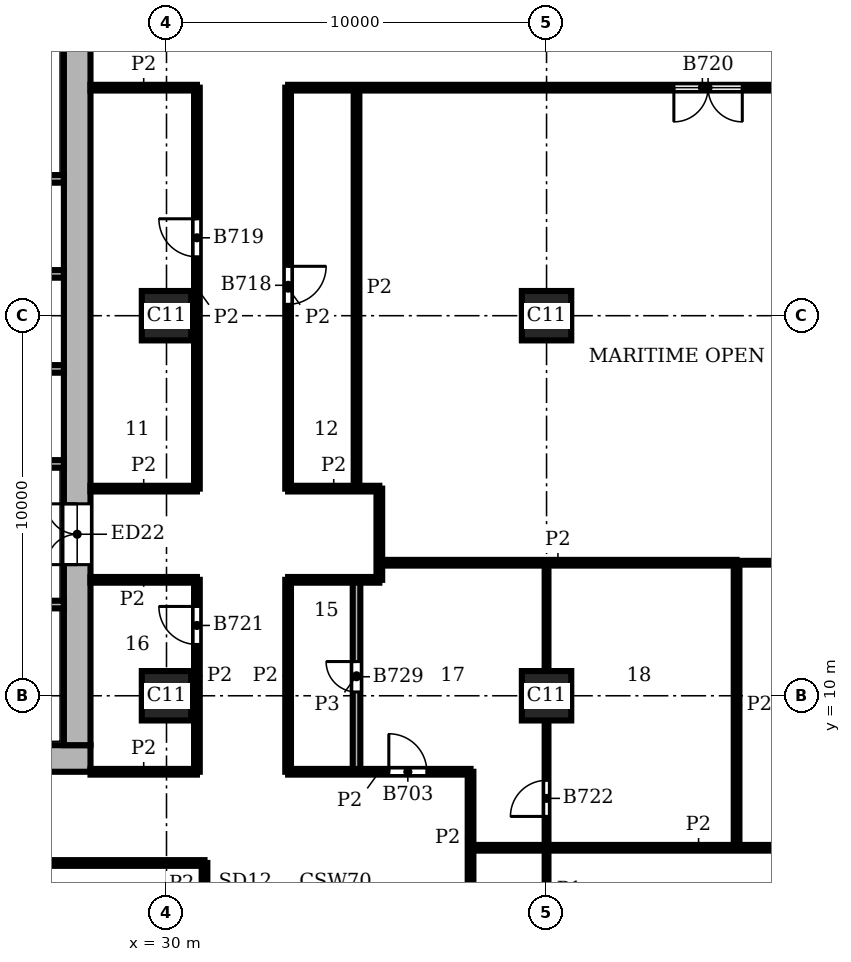
"""IFC4 building model, lengths in metres.
Left out: names, types, materials, properties, quantities, classifications, styles, units other than length and angle.
Written with IfcOpenShell. Run it as: python <this file> out.ifc"""

import sys

from ifc_helpers import new_model, si_unit, direction, frame, frame_2d, origin, origin_2d, place, context, subcontext, project, spatial, rectangle, extrude, element, fill, save


model = new_model("IFC4")
c1 = context("Model", 3, precision=1e-05, world=origin(), true_north=direction((0.0, 1.0)))
c2 = subcontext(c1, "Body", "Model", "MODEL_VIEW")
j1 = project(units=[si_unit("LENGTHUNIT", "METRE"), si_unit("PLANEANGLEUNIT", "RADIAN")], contexts=[c1])
p1 = place(None, origin())
s1 = spatial("IfcSite", under=j1, at=p1, CompositionType="ELEMENT")
p2 = place(p1, origin())
s2 = spatial("IfcBuilding", under=s1, at=p2, CompositionType="ELEMENT")
p3 = place(p2, frame((0.0, 0.0, 205.8)))
s3 = spatial("IfcBuildingStorey", under=s2, at=p3, CompositionType="ELEMENT", Elevation=205.8)
for number, where, z_axis, x_axis in (
    (1, (30.0, 10.0, 0.0), (0.0, 0.0, 1.0), (1.0, 0.0, 0.0)),
    (2, (30.0, 20.0, 0.0), (0.0, 0.0, 1.0), (1.0, 0.0, 0.0)),
    (3, (40.0, 10.0, 0.0), (0.0, 0.0, 1.0), (1.0, 0.0, 0.0)),
    (4, (40.0, 20.0, 0.0), (0.0, 0.0, 1.0), (1.0, 0.0, 0.0)),
):
    element("IfcColumn", number, at=place(p3, frame(where, z_axis=z_axis, x_axis=x_axis)), inside=s3, PredefinedType="COLUMN", context=c2, shape_type="SweptSolid", body=[
        extrude(rectangle(XDim=1.3, YDim=1.3, at=origin_2d()), origin(), (0.0, 0.0, 1.0), 3.9),
    ])
p4 = place(p3, frame((8.0, 8.35, 0.0), z_axis=(0.0, 0.0, 1.0), x_axis=(1.0, 0.0, 0.0)))
e5 = element("IfcWall", 5, at=p4, inside=s3, PredefinedType="SHEAR", context=c2, shape_type="SweptSolid", body=[
    extrude(rectangle(XDim=20.0, YDim=0.7, at=frame_2d((10.0, 0.0))), origin(), (0.0, 0.0, 1.0), 3.9),
])
p5 = place(p3, frame((27.65, 8.7, 0.0), z_axis=(0.0, 0.0, 1.0), x_axis=(0.0, 1.0, 0.0)))
e6 = element("IfcWall", 6, at=p5, inside=s3, PredefinedType="SHEAR", context=c2, shape_type="SweptSolid", body=[
    extrude(rectangle(XDim=18.6, YDim=0.7, at=frame_2d((9.3, 0.0))), origin(), (0.0, 0.0, 1.0), 3.9),
])
p6 = place(p5, frame((4.75, 0.0, 0.0)))
e7 = element("IfcOpeningElement", 7, at=p6, cuts=e6, PredefinedType="OPENING", context=c2, shape_type="SweptSolid", body=[
    extrude(rectangle(XDim=1.6, YDim=2.1, at=frame_2d((0.8, 1.05))), frame((0.0, 0.36, 0.0), z_axis=(0.0, -1.0, 0.0), x_axis=(1.0, 0.0, 0.0)), (0.0, 0.0, 1.0), 0.72),
])
p7 = place(p3, frame((13.8, 12.4, 0.0), z_axis=(0.0, 0.0, 1.0), x_axis=(1.0, 0.0, 0.0)))
e8 = element("IfcWall", 8, at=p7, inside=s3, PredefinedType="SHEAR", context=c2, shape_type="SweptSolid", body=[
    extrude(rectangle(XDim=13.5, YDim=0.2, at=frame_2d((6.75, 0.0))), origin(), (0.0, 0.0, 1.0), 3.58),
])
p8 = place(p7, frame((2.4, 0.0, 0.0)))
e9 = element("IfcOpeningElement", 9, at=p8, cuts=e8, PredefinedType="OPENING", context=c2, shape_type="SweptSolid", body=[
    extrude(rectangle(XDim=1.1, YDim=2.1, at=frame_2d((0.55, 1.05))), frame((0.0, 0.11, 0.0), z_axis=(0.0, -1.0, 0.0), x_axis=(1.0, 0.0, 0.0)), (0.0, 0.0, 1.0), 0.22),
])
p9 = place(p7, frame((4.9, 0.0, 0.0)))
e10 = element("IfcOpeningElement", 10, at=p9, cuts=e8, PredefinedType="OPENING", context=c2, shape_type="SweptSolid", body=[
    extrude(rectangle(XDim=1.1, YDim=2.1, at=frame_2d((0.55, 1.05))), frame((0.0, 0.11, 0.0), z_axis=(0.0, -1.0, 0.0), x_axis=(1.0, 0.0, 0.0)), (0.0, 0.0, 1.0), 0.22),
])
p10 = place(p7, frame((0.2, 0.0, 0.0)))
e11 = element("IfcOpeningElement", 11, at=p10, cuts=e8, PredefinedType="OPENING", context=c2, shape_type="SweptSolid", body=[
    extrude(rectangle(XDim=1.0, YDim=2.1, at=frame_2d((0.5, 1.05))), frame((0.0, 0.11, 0.0), z_axis=(0.0, -1.0, 0.0), x_axis=(1.0, 0.0, 0.0)), (0.0, 0.0, 1.0), 0.22),
])
for number, where, z_axis, x_axis in (
    (12, (24.3, 16.1, 0.0), (0.0, 0.0, 1.0), (1.0, 0.0, 0.0)),
    (13, (24.3, 18.6, 0.0), (0.0, 0.0, 1.0), (1.0, 0.0, 0.0)),
    (14, (24.3, 21.1, 0.0), (0.0, 0.0, 1.0), (1.0, 0.0, 0.0)),
):
    element("IfcWall", number, at=place(p3, frame(where, z_axis=z_axis, x_axis=x_axis)), inside=s3, PredefinedType="SHEAR", context=c2, shape_type="SweptSolid", body=[
        extrude(rectangle(XDim=3.0, YDim=0.2, at=frame_2d((1.5, 0.0))), origin(), (0.0, 0.0, 1.0), 3.58),
    ])
p11 = place(p3, frame((13.8, 23.6, 0.0), z_axis=(0.0, 0.0, 1.0), x_axis=(1.0, 0.0, 0.0)))
e15 = element("IfcWall", 15, at=p11, inside=s3, PredefinedType="SHEAR", context=c2, shape_type="SweptSolid", body=[
    extrude(rectangle(XDim=13.5, YDim=0.2, at=frame_2d((6.75, 0.0))), origin(), (0.0, 0.0, 1.0), 3.58),
])
p12 = place(p11, frame((2.4, 0.0, 0.0)))
e16 = element("IfcOpeningElement", 16, at=p12, cuts=e15, PredefinedType="OPENING", context=c2, shape_type="SweptSolid", body=[
    extrude(rectangle(XDim=1.1, YDim=2.1, at=frame_2d((0.55, 1.05))), frame((0.0, 0.11, 0.0), z_axis=(0.0, -1.0, 0.0), x_axis=(1.0, 0.0, 0.0)), (0.0, 0.0, 1.0), 0.22),
])
p13 = place(p11, frame((4.9, 0.0, 0.0)))
e17 = element("IfcOpeningElement", 17, at=p13, cuts=e15, PredefinedType="OPENING", context=c2, shape_type="SweptSolid", body=[
    extrude(rectangle(XDim=1.1, YDim=2.1, at=frame_2d((0.55, 1.05))), frame((0.0, 0.11, 0.0), z_axis=(0.0, -1.0, 0.0), x_axis=(1.0, 0.0, 0.0)), (0.0, 0.0, 1.0), 0.22),
])
p14 = place(p11, frame((0.2, 0.0, 0.0)))
e18 = element("IfcOpeningElement", 18, at=p14, cuts=e15, PredefinedType="OPENING", context=c2, shape_type="SweptSolid", body=[
    extrude(rectangle(XDim=1.0, YDim=2.1, at=frame_2d((0.5, 1.05))), frame((0.0, 0.11, 0.0), z_axis=(0.0, -1.0, 0.0), x_axis=(1.0, 0.0, 0.0)), (0.0, 0.0, 1.0), 0.22),
])
p15 = place(p3, frame((40.0, 0.45, 0.0), z_axis=(0.0, 0.0, 1.0), x_axis=(0.0, 1.0, 0.0)))
e19 = element("IfcWall", 19, at=p15, inside=s3, PredefinedType="PARTITIONING", context=c2, shape_type="SweptSolid", body=[
    extrude(rectangle(XDim=8.9, YDim=0.1, at=frame_2d((4.45, 0.0))), origin(), (0.0, 0.0, 1.0), 3.58),
])
p16 = place(p15, frame((6.375, 0.0, 0.0)))
e20 = element("IfcOpeningElement", 20, at=p16, cuts=e19, PredefinedType="OPENING", context=c2, shape_type="SweptSolid", body=[
    extrude(rectangle(XDim=0.95, YDim=2.1, at=frame_2d((0.475, 1.05))), frame((0.0, 0.06, 0.0), z_axis=(0.0, -1.0, 0.0), x_axis=(1.0, 0.0, 0.0)), (0.0, 0.0, 1.0), 0.12),
])
p17 = place(p15, frame((3.0, 0.0, 0.0)))
e21 = element("IfcOpeningElement", 21, at=p17, cuts=e19, PredefinedType="OPENING", context=c2, shape_type="SweptSolid", body=[
    extrude(rectangle(XDim=0.9, YDim=2.1, at=frame_2d((0.45, 1.05))), frame((0.0, 0.06, 0.0), z_axis=(0.0, -1.0, 0.0), x_axis=(1.0, 0.0, 0.0)), (0.0, 0.0, 1.0), 0.12),
])
p18 = place(p3, frame((40.0, 10.65, 0.0), z_axis=(0.0, 0.0, 1.0), x_axis=(0.0, 1.0, 0.0)))
e22 = element("IfcWall", 22, at=p18, inside=s3, PredefinedType="PARTITIONING", context=c2, shape_type="SweptSolid", body=[
    extrude(rectangle(XDim=2.85, YDim=0.1, at=frame_2d((1.425, 0.0))), origin(), (0.0, 0.0, 1.0), 3.58),
])
p19 = place(p3, frame((45.0, 13.5, 0.0), z_axis=(0.0, 0.0, 1.0), x_axis=(1.0, 0.0, 0.0)))
e23 = element("IfcWall", 23, at=p19, inside=s3, PredefinedType="PARTITIONING", context=c2, shape_type="SweptSolid", body=[
    extrude(rectangle(XDim=5.0, YDim=0.1, at=frame_2d((2.5, 0.0))), origin(), (0.0, 0.0, 1.0), 3.58),
])
p20 = place(p19, frame((2.35, 0.0, 0.0)))
e24 = element("IfcOpeningElement", 24, at=p20, cuts=e23, PredefinedType="OPENING", context=c2, shape_type="SweptSolid", body=[
    extrude(rectangle(XDim=0.9, YDim=2.1, at=frame_2d((0.45, 1.05))), frame((0.0, 0.06, 0.0), z_axis=(0.0, -1.0, 0.0), x_axis=(1.0, 0.0, 0.0)), (0.0, 0.0, 1.0), 0.12),
])
p21 = place(p3, frame((30.8, 8.0, 0.0), z_axis=(0.0, 0.0, 1.0), x_axis=(0.0, 1.0, 0.0)))
e25 = element("IfcWall", 25, at=p21, inside=s3, PredefinedType="PARTITIONING", context=c2, shape_type="SweptSolid", body=[
    extrude(rectangle(XDim=5.05, YDim=0.15, at=frame_2d((2.525, 0.0))), origin(), (0.0, 0.0, 1.0), 3.58),
])
p22 = place(p21, frame((3.35, 0.0, 0.0)))
e26 = element("IfcOpeningElement", 26, at=p22, cuts=e25, PredefinedType="OPENING", context=c2, shape_type="SweptSolid", body=[
    extrude(rectangle(XDim=1.0, YDim=2.1, at=frame_2d((0.5, 1.05))), frame((0.0, 0.085, 0.0), z_axis=(0.0, -1.0, 0.0), x_axis=(1.0, 0.0, 0.0)), (0.0, 0.0, 1.0), 0.17),
])
p23 = place(p3, frame((30.8, 15.45, 0.0), z_axis=(0.0, 0.0, 1.0), x_axis=(0.0, 1.0, 0.0)))
e27 = element("IfcWall", 27, at=p23, inside=s3, PredefinedType="PARTITIONING", context=c2, shape_type="SweptSolid", body=[
    extrude(rectangle(XDim=10.55, YDim=0.15, at=frame_2d((5.275, 0.0))), origin(), (0.0, 0.0, 1.0), 3.58),
])
p24 = place(p23, frame((6.1, 0.0, 0.0)))
e28 = element("IfcOpeningElement", 28, at=p24, cuts=e27, PredefinedType="OPENING", context=c2, shape_type="SweptSolid", body=[
    extrude(rectangle(XDim=1.0, YDim=2.1, at=frame_2d((0.5, 1.05))), frame((0.0, 0.085, 0.0), z_axis=(0.0, -1.0, 0.0), x_axis=(1.0, 0.0, 0.0)), (0.0, 0.0, 1.0), 0.17),
])
p25 = place(p3, frame((31.0, 4.5, 0.0), z_axis=(0.0, 0.0, 1.0), x_axis=(0.0, 1.0, 0.0)))
e29 = element("IfcWall", 29, at=p25, inside=s3, PredefinedType="PARTITIONING", context=c2, shape_type="SweptSolid", body=[
    extrude(rectangle(XDim=1.1, YDim=0.15, at=frame_2d((0.55, 0.0))), origin(), (0.0, 0.0, 1.0), 3.58),
])
p26 = place(p3, frame((33.2, 8.0, 0.0), z_axis=(0.0, 0.0, 1.0), x_axis=(0.0, 1.0, 0.0)))
e30 = element("IfcWall", 30, at=p26, inside=s3, PredefinedType="PARTITIONING", context=c2, shape_type="SweptSolid", body=[
    extrude(rectangle(XDim=5.05, YDim=0.15, at=frame_2d((2.525, 0.0))), origin(), (0.0, 0.0, 1.0), 3.58),
])
p27 = place(p3, frame((33.2, 15.45, 0.0), z_axis=(0.0, 0.0, 1.0), x_axis=(0.0, 1.0, 0.0)))
e31 = element("IfcWall", 31, at=p27, inside=s3, PredefinedType="PARTITIONING", context=c2, shape_type="SweptSolid", body=[
    extrude(rectangle(XDim=10.55, YDim=0.15, at=frame_2d((5.275, 0.0))), origin(), (0.0, 0.0, 1.0), 3.58),
])
p28 = place(p27, frame((4.85, 0.0, 0.0)))
e32 = element("IfcOpeningElement", 32, at=p28, cuts=e31, PredefinedType="OPENING", context=c2, shape_type="SweptSolid", body=[
    extrude(rectangle(XDim=1.0, YDim=2.1, at=frame_2d((0.5, 1.05))), frame((0.0, 0.085, 0.0), z_axis=(0.0, -1.0, 0.0), x_axis=(1.0, 0.0, 0.0)), (0.0, 0.0, 1.0), 0.17),
])
p29 = place(p3, frame((35.0, 15.45, 0.0), z_axis=(0.0, 0.0, 1.0), x_axis=(0.0, 1.0, 0.0)))
e33 = element("IfcWall", 33, at=p29, inside=s3, PredefinedType="PARTITIONING", context=c2, shape_type="SweptSolid", body=[
    extrude(rectangle(XDim=10.55, YDim=0.15, at=frame_2d((5.275, 0.0))), origin(), (0.0, 0.0, 1.0), 3.58),
])
p30 = place(p3, frame((35.6, 13.05, 0.0), z_axis=(0.0, 0.0, 1.0), x_axis=(0.0, 1.0, 0.0)))
e34 = element("IfcWall", 34, at=p30, inside=s3, PredefinedType="PARTITIONING", context=c2, shape_type="SweptSolid", body=[
    extrude(rectangle(XDim=2.4, YDim=0.15, at=frame_2d((1.2, 0.0))), origin(), (0.0, 0.0, 1.0), 3.58),
])
p31 = place(p3, frame((38.0, 4.5, 0.0), z_axis=(0.0, 0.0, 1.0), x_axis=(0.0, 1.0, 0.0)))
e35 = element("IfcWall", 35, at=p31, inside=s3, PredefinedType="PARTITIONING", context=c2, shape_type="SweptSolid", body=[
    extrude(rectangle(XDim=3.5, YDim=0.15, at=frame_2d((1.75, 0.0))), origin(), (0.0, 0.0, 1.0), 3.58),
])
p32 = place(p3, frame((45.0, 6.0, 0.0), z_axis=(0.0, 0.0, 1.0), x_axis=(0.0, 1.0, 0.0)))
e36 = element("IfcWall", 36, at=p32, inside=s3, PredefinedType="PARTITIONING", context=c2, shape_type="SweptSolid", body=[
    extrude(rectangle(XDim=7.5, YDim=0.15, at=frame_2d((3.75, 0.0))), origin(), (0.0, 0.0, 1.0), 3.58),
])
p33 = place(p3, frame((5.6, 5.6, 0.0), z_axis=(0.0, 0.0, 1.0), x_axis=(1.0, 0.0, 0.0)))
e37 = element("IfcWall", 37, at=p33, inside=s3, PredefinedType="PARTITIONING", context=c2, shape_type="SweptSolid", body=[
    extrude(rectangle(XDim=25.4, YDim=0.15, at=frame_2d((12.7, 0.0))), origin(), (0.0, 0.0, 1.0), 3.58),
])
p34 = place(p33, frame((5.35, 0.0, 0.0)))
e38 = element("IfcOpeningElement", 38, at=p34, cuts=e37, PredefinedType="OPENING", context=c2, shape_type="SweptSolid", body=[
    extrude(rectangle(XDim=1.0, YDim=2.1, at=frame_2d((0.5, 1.05))), frame((0.0, 0.085, 0.0), z_axis=(0.0, -1.0, 0.0), x_axis=(1.0, 0.0, 0.0)), (0.0, 0.0, 1.0), 0.17),
])
p35 = place(p33, frame((11.25, 0.0, 0.0)))
e39 = element("IfcOpeningElement", 39, at=p35, cuts=e37, PredefinedType="OPENING", context=c2, shape_type="SweptSolid", body=[
    extrude(rectangle(XDim=1.0, YDim=2.1, at=frame_2d((0.5, 1.05))), frame((0.0, 0.085, 0.0), z_axis=(0.0, -1.0, 0.0), x_axis=(1.0, 0.0, 0.0)), (0.0, 0.0, 1.0), 0.17),
])
p36 = place(p33, frame((18.75, 0.0, 0.0)))
e40 = element("IfcOpeningElement", 40, at=p36, cuts=e37, PredefinedType="OPENING", context=c2, shape_type="SweptSolid", body=[
    extrude(rectangle(XDim=1.0, YDim=2.1, at=frame_2d((0.5, 1.05))), frame((0.0, 0.085, 0.0), z_axis=(0.0, -1.0, 0.0), x_axis=(1.0, 0.0, 0.0)), (0.0, 0.0, 1.0), 0.17),
])
p37 = place(p3, frame((38.0, 6.0, 0.0), z_axis=(0.0, 0.0, 1.0), x_axis=(1.0, 0.0, 0.0)))
e41 = element("IfcWall", 41, at=p37, inside=s3, PredefinedType="PARTITIONING", context=c2, shape_type="SweptSolid", body=[
    extrude(rectangle(XDim=12.0, YDim=0.15, at=frame_2d((6.0, 0.0))), origin(), (0.0, 0.0, 1.0), 3.58),
])
p38 = place(p3, frame((28.0, 8.0, 0.0), z_axis=(0.0, 0.0, 1.0), x_axis=(1.0, 0.0, 0.0)))
e42 = element("IfcWall", 42, at=p38, inside=s3, PredefinedType="PARTITIONING", context=c2, shape_type="SweptSolid", body=[
    extrude(rectangle(XDim=2.8, YDim=0.15, at=frame_2d((1.4, 0.0))), origin(), (0.0, 0.0, 1.0), 3.58),
])
p39 = place(p3, frame((33.2, 8.0, 0.0), z_axis=(0.0, 0.0, 1.0), x_axis=(1.0, 0.0, 0.0)))
e43 = element("IfcWall", 43, at=p39, inside=s3, PredefinedType="PARTITIONING", context=c2, shape_type="SweptSolid", body=[
    extrude(rectangle(XDim=4.8, YDim=0.15, at=frame_2d((2.4, 0.0))), origin(), (0.0, 0.0, 1.0), 3.58),
])
p40 = place(p39, frame((2.65, 0.0, 0.0)))
e44 = element("IfcOpeningElement", 44, at=p40, cuts=e43, PredefinedType="OPENING", context=c2, shape_type="SweptSolid", body=[
    extrude(rectangle(XDim=1.0, YDim=2.1, at=frame_2d((0.5, 1.05))), frame((0.0, 0.085, 0.0), z_axis=(0.0, -1.0, 0.0), x_axis=(1.0, 0.0, 0.0)), (0.0, 0.0, 1.0), 0.17),
])
p41 = place(p3, frame((28.0, 13.05, 0.0), z_axis=(0.0, 0.0, 1.0), x_axis=(1.0, 0.0, 0.0)))
e45 = element("IfcWall", 45, at=p41, inside=s3, PredefinedType="PARTITIONING", context=c2, shape_type="SweptSolid", body=[
    extrude(rectangle(XDim=2.8, YDim=0.15, at=frame_2d((1.4, 0.0))), origin(), (0.0, 0.0, 1.0), 3.58),
])
p42 = place(p3, frame((33.2, 13.05, 0.0), z_axis=(0.0, 0.0, 1.0), x_axis=(1.0, 0.0, 0.0)))
e46 = element("IfcWall", 46, at=p42, inside=s3, PredefinedType="PARTITIONING", context=c2, shape_type="SweptSolid", body=[
    extrude(rectangle(XDim=2.4, YDim=0.15, at=frame_2d((1.2, 0.0))), origin(), (0.0, 0.0, 1.0), 3.58),
])
p43 = place(p3, frame((35.6, 13.5, 0.0), z_axis=(0.0, 0.0, 1.0), x_axis=(1.0, 0.0, 0.0)))
e47 = element("IfcWall", 47, at=p43, inside=s3, PredefinedType="PARTITIONING", context=c2, shape_type="SweptSolid", body=[
    extrude(rectangle(XDim=9.4, YDim=0.15, at=frame_2d((4.7, 0.0))), origin(), (0.0, 0.0, 1.0), 3.58),
])
p44 = place(p3, frame((28.0, 15.45, 0.0), z_axis=(0.0, 0.0, 1.0), x_axis=(1.0, 0.0, 0.0)))
e48 = element("IfcWall", 48, at=p44, inside=s3, PredefinedType="PARTITIONING", context=c2, shape_type="SweptSolid", body=[
    extrude(rectangle(XDim=2.8, YDim=0.15, at=frame_2d((1.4, 0.0))), origin(), (0.0, 0.0, 1.0), 3.58),
])
p45 = place(p3, frame((33.2, 15.45, 0.0), z_axis=(0.0, 0.0, 1.0), x_axis=(1.0, 0.0, 0.0)))
e49 = element("IfcWall", 49, at=p45, inside=s3, PredefinedType="PARTITIONING", context=c2, shape_type="SweptSolid", body=[
    extrude(rectangle(XDim=2.4, YDim=0.15, at=frame_2d((1.2, 0.0))), origin(), (0.0, 0.0, 1.0), 3.58),
])
p46 = place(p3, frame((28.0, 26.0, 0.0), z_axis=(0.0, 0.0, 1.0), x_axis=(1.0, 0.0, 0.0)))
e50 = element("IfcWall", 50, at=p46, inside=s3, PredefinedType="PARTITIONING", context=c2, shape_type="SweptSolid", body=[
    extrude(rectangle(XDim=2.8, YDim=0.15, at=frame_2d((1.4, 0.0))), origin(), (0.0, 0.0, 1.0), 3.58),
])
p47 = place(p3, frame((33.2, 26.0, 0.0), z_axis=(0.0, 0.0, 1.0), x_axis=(1.0, 0.0, 0.0)))
e51 = element("IfcWall", 51, at=p47, inside=s3, PredefinedType="PARTITIONING", context=c2, shape_type="SweptSolid", body=[
    extrude(rectangle(XDim=21.8, YDim=0.15, at=frame_2d((10.9, 0.0))), origin(), (0.0, 0.0, 1.0), 3.58),
])
p48 = place(p47, frame((10.15, 0.0, 0.0)))
e52 = element("IfcOpeningElement", 52, at=p48, cuts=e51, PredefinedType="OPENING", context=c2, shape_type="SweptSolid", body=[
    extrude(rectangle(XDim=1.8, YDim=2.1, at=frame_2d((0.9, 1.05))), frame((0.0, 0.085, 0.0), z_axis=(0.0, -1.0, 0.0), x_axis=(1.0, 0.0, 0.0)), (0.0, 0.0, 1.0), 0.17),
])
p49 = place(p3, frame((35.0, 8.0, 0.0), z_axis=(0.0, 0.0, 1.0), x_axis=(0.0, 1.0, 0.0)))
e53 = element("IfcWall", 53, at=p49, inside=s3, PredefinedType="PARTITIONING", context=c2, shape_type="SweptSolid", body=[
    extrude(rectangle(XDim=5.05, YDim=0.2, at=frame_2d((2.525, 0.0))), origin(), (0.0, 0.0, 1.0), 3.58),
])
p50 = place(p49, frame((2.1, 0.0, 0.0)))
e54 = element("IfcOpeningElement", 54, at=p50, cuts=e53, PredefinedType="OPENING", context=c2, shape_type="SweptSolid", body=[
    extrude(rectangle(XDim=0.8, YDim=2.1, at=frame_2d((0.4, 1.05))), frame((0.0, 0.11, 0.0), z_axis=(0.0, -1.0, 0.0), x_axis=(1.0, 0.0, 0.0)), (0.0, 0.0, 1.0), 0.22),
])
p51 = place(p6, origin())
e55 = element("IfcDoor", 55, at=p51, inside=s3, OperationType="DOUBLE_DOOR_SINGLE_SWING", PredefinedType="DOOR", context=c2, shape_type="SweptSolid", body=[
    extrude(rectangle(XDim=1.6, YDim=2.1, at=frame_2d((0.8, 1.05))), frame((0.0, 0.025, 0.0), z_axis=(0.0, -1.0, 0.0), x_axis=(1.0, 0.0, 0.0)), (0.0, 0.0, 1.0), 0.05),
])
fill(e7, e55)
p52 = place(p40, origin())
e56 = element("IfcDoor", 56, at=p52, inside=s3, OperationType="SINGLE_SWING_LEFT", PredefinedType="DOOR", context=c2, shape_type="SweptSolid", body=[
    extrude(rectangle(XDim=1.0, YDim=2.1, at=frame_2d((0.5, 1.05))), frame((0.0, 0.025, 0.0), z_axis=(0.0, -1.0, 0.0), x_axis=(1.0, 0.0, 0.0)), (0.0, 0.0, 1.0), 0.05),
])
fill(e44, e56)
p53 = place(p28, frame((1.0, 0.0, 0.0), z_axis=(0.0, 0.0, 1.0), x_axis=(-1.0, 0.0, 0.0)))
e57 = element("IfcDoor", 57, at=p53, inside=s3, OperationType="SINGLE_SWING_LEFT", PredefinedType="DOOR", context=c2, shape_type="SweptSolid", body=[
    extrude(rectangle(XDim=1.0, YDim=2.1, at=frame_2d((0.5, 1.05))), frame((0.0, 0.025, 0.0), z_axis=(0.0, -1.0, 0.0), x_axis=(1.0, 0.0, 0.0)), (0.0, 0.0, 1.0), 0.05),
])
fill(e32, e57)
p54 = place(p24, origin())
e58 = element("IfcDoor", 58, at=p54, inside=s3, OperationType="SINGLE_SWING_RIGHT", PredefinedType="DOOR", context=c2, shape_type="SweptSolid", body=[
    extrude(rectangle(XDim=1.0, YDim=2.1, at=frame_2d((0.5, 1.05))), frame((0.0, 0.025, 0.0), z_axis=(0.0, -1.0, 0.0), x_axis=(1.0, 0.0, 0.0)), (0.0, 0.0, 1.0), 0.05),
])
fill(e28, e58)
p55 = place(p48, frame((1.8, 0.0, 0.0), z_axis=(0.0, 0.0, 1.0), x_axis=(-1.0, 0.0, 0.0)))
e59 = element("IfcDoor", 59, at=p55, inside=s3, OperationType="DOUBLE_DOOR_SINGLE_SWING", PredefinedType="DOOR", context=c2, shape_type="SweptSolid", body=[
    extrude(rectangle(XDim=1.8, YDim=2.1, at=frame_2d((0.9, 1.05))), frame((0.0, 0.025, 0.0), z_axis=(0.0, -1.0, 0.0), x_axis=(1.0, 0.0, 0.0)), (0.0, 0.0, 1.0), 0.05),
])
fill(e52, e59)
p56 = place(p22, origin())
e60 = element("IfcDoor", 60, at=p56, inside=s3, OperationType="SINGLE_SWING_RIGHT", PredefinedType="DOOR", context=c2, shape_type="SweptSolid", body=[
    extrude(rectangle(XDim=1.0, YDim=2.1, at=frame_2d((0.5, 1.05))), frame((0.0, 0.025, 0.0), z_axis=(0.0, -1.0, 0.0), x_axis=(1.0, 0.0, 0.0)), (0.0, 0.0, 1.0), 0.05),
])
fill(e26, e60)
p57 = place(p16, origin())
e61 = element("IfcDoor", 61, at=p57, inside=s3, OperationType="SINGLE_SWING_LEFT", PredefinedType="DOOR", context=c2, shape_type="SweptSolid", body=[
    extrude(rectangle(XDim=0.95, YDim=2.1, at=frame_2d((0.475, 1.05))), frame((0.0, 0.025, 0.0), z_axis=(0.0, -1.0, 0.0), x_axis=(1.0, 0.0, 0.0)), (0.0, 0.0, 1.0), 0.05),
])
fill(e20, e61)
p58 = place(p50, origin())
e62 = element("IfcDoor", 62, at=p58, inside=s3, OperationType="SINGLE_SWING_RIGHT", PredefinedType="DOOR", context=c2, shape_type="SweptSolid", body=[
    extrude(rectangle(XDim=0.8, YDim=2.1, at=frame_2d((0.4, 1.05))), frame((0.0, 0.025, 0.0), z_axis=(0.0, -1.0, 0.0), x_axis=(1.0, 0.0, 0.0)), (0.0, 0.0, 1.0), 0.05),
])
fill(e54, e62)
save(model, sys.argv[1])
